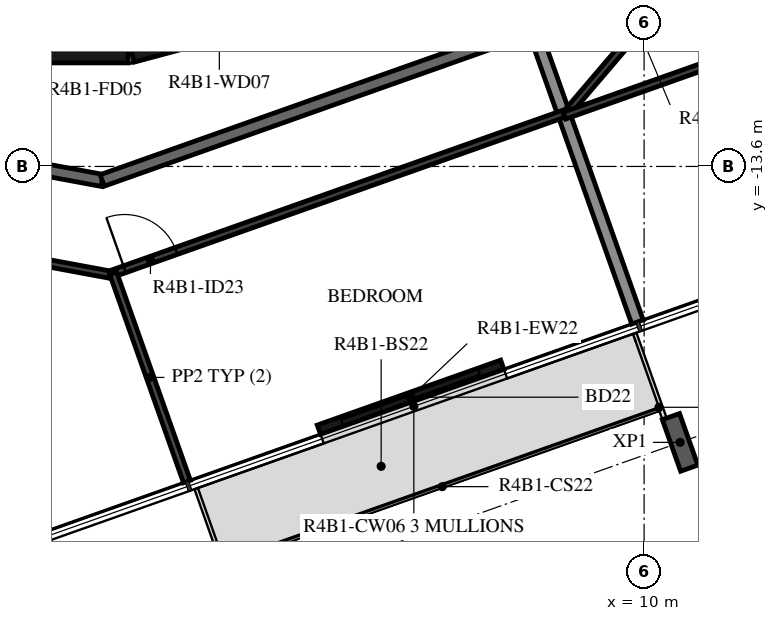
"""IFC4 building model, lengths in metres.
Left out: names, types, materials, properties, quantities, classifications, styles, units other than length and angle.
Written with IfcOpenShell. Run it as: python <this file> out.ifc"""

import sys

from ifc_helpers import new_model, si_unit, direction, frame, frame_2d, origin, origin_2d, place, context, subcontext, project, spatial, rectangle, i_section, extrude, element, fill, save


model = new_model("IFC4")
c1 = context("Model", 3, precision=1e-05, world=origin(), true_north=direction((0.0, 1.0)))
c2 = subcontext(c1, "Body", "Model", "MODEL_VIEW")
j1 = project(units=[si_unit("LENGTHUNIT", "METRE"), si_unit("PLANEANGLEUNIT", "RADIAN")], contexts=[c1])
p1 = place(None, origin())
s1 = spatial("IfcSite", under=j1, at=p1, CompositionType="ELEMENT")
p2 = place(p1, origin())
s2 = spatial("IfcBuilding", under=s1, at=p2, CompositionType="ELEMENT")
p3 = place(p2, frame((0.0, 0.0, 162.2)))
s3 = spatial("IfcBuildingStorey", under=s2, at=p3, CompositionType="ELEMENT", Elevation=162.2)
p4 = place(p3, frame((10.592, -18.138, -0.38), z_axis=(0.0, 0.0, 1.0), x_axis=(-0.942641392079, -0.333807138839, 0.0)))
e1 = element("IfcColumn", 1, at=p4, inside=s3, PredefinedType="COLUMN", context=c2, shape_type="SweptSolid", body=[
    extrude(i_section(OverallWidth=0.3, OverallDepth=0.9, WebThickness=0.019, FlangeThickness=0.035, FilletRadius=0.03, at=origin_2d()), origin(), (0.0, 0.0, 1.0), 3.5),
])
p5 = place(p3, frame((4.652, -17.929, 0.0), z_axis=(0.0, 0.0, 1.0), x_axis=(0.942620722428, 0.333865502335, 0.0)))
e2 = element("IfcWall", 2, at=p5, inside=s3, PredefinedType="STANDARD", context=c2, shape_type="SweptSolid", body=[
    extrude(rectangle(XDim=3.2, YDim=0.16, at=frame_2d((1.6, 0.0))), origin(), (0.0, 0.0, 1.0), 3.12),
])
p6 = place(p5, frame((0.4, 0.0, 0.0)))
e3 = element("IfcOpeningElement", 3, at=p6, cuts=e2, PredefinedType="OPENING", context=c2, shape_type="SweptSolid", body=[
    extrude(rectangle(XDim=2.4, YDim=2.4, at=frame_2d((1.2, 1.2))), frame((0.0, 0.09, 0.0), z_axis=(0.0, -1.0, 0.0), x_axis=(1.0, 0.0, 0.0)), (0.0, 0.0, 1.0), 0.18),
])
p7 = place(p3, frame((1.55, -11.643, 0.0), z_axis=(0.0, 0.0, 1.0), x_axis=(0.965948410781, 0.258734743916, 0.0)))
e4 = element("IfcWall", 4, at=p7, inside=s3, PredefinedType="SHEAR", context=c2, shape_type="SweptSolid", body=[
    extrude(rectangle(XDim=3.033, YDim=0.5, at=frame_2d((1.516, 0.0))), origin(), (0.0, 0.0, 1.0), 3.12),
])
p8 = place(p7, frame((1.066, 0.0, 0.0)))
e5 = element("IfcOpeningElement", 5, at=p8, cuts=e4, PredefinedType="OPENING", context=c2, shape_type="SweptSolid", body=[
    extrude(rectangle(XDim=0.9, YDim=2.1, at=frame_2d((0.45, 1.05))), frame((0.0, 0.26, 0.0), z_axis=(0.0, -1.0, 0.0), x_axis=(1.0, 0.0, 0.0)), (0.0, 0.0, 1.0), 0.52),
])
p9 = place(p3, frame((-1.516, -11.647, 0.0), z_axis=(0.0, 0.0, 1.0), x_axis=(1.0, 0.0, 0.0)))
e6 = element("IfcWall", 6, at=p9, inside=s3, PredefinedType="SHEAR", context=c2, shape_type="SweptSolid", body=[
    extrude(rectangle(XDim=3.033, YDim=0.5, at=frame_2d((1.516, 0.0))), origin(), (0.0, 0.0, 1.0), 3.12),
])
p10 = place(p9, frame((0.016, 0.0, 0.0)))
e7 = element("IfcOpeningElement", 7, at=p10, cuts=e6, PredefinedType="OPENING", context=c2, shape_type="SweptSolid", body=[
    extrude(rectangle(XDim=1.2, YDim=2.1, at=frame_2d((0.6, 1.05))), frame((0.0, 0.26, 0.0), z_axis=(0.0, -1.0, 0.0), x_axis=(1.0, 0.0, 0.0)), (0.0, 0.0, 1.0), 0.52),
])
p11 = place(p3, frame((-5.972, -12.521, 0.0), z_axis=(0.0, 0.0, 1.0), x_axis=(0.983256068163, -0.18222926335, 0.0)))
e8 = element("IfcWall", 8, at=p11, inside=s3, PredefinedType="STANDARD", context=c2, shape_type="SweptSolid", body=[
    extrude(rectangle(XDim=7.181, YDim=0.2, at=frame_2d((3.59, 0.0))), origin(), (0.0, 0.0, 1.0), 3.12),
])
p12 = place(p11, frame((4.6, 0.0, 0.0)))
e9 = element("IfcOpeningElement", 9, at=p12, cuts=e8, PredefinedType="OPENING", context=c2, shape_type="SweptSolid", body=[
    extrude(rectangle(XDim=1.0, YDim=2.1, at=frame_2d((0.5, 1.05))), frame((0.0, 0.11, 0.0), z_axis=(0.0, -1.0, 0.0), x_axis=(1.0, 0.0, 0.0)), (0.0, 0.0, 1.0), 0.22),
])
p13 = place(p3, frame((1.088, -13.83, 0.0), z_axis=(0.0, 0.0, 1.0), x_axis=(0.942648397945, 0.333787354241, 0.0)))
e10 = element("IfcWall", 10, at=p13, inside=s3, PredefinedType="STANDARD", context=c2, shape_type="SweptSolid", body=[
    extrude(rectangle(XDim=7.181, YDim=0.2, at=frame_2d((3.591, 0.0))), origin(), (0.0, 0.0, 1.0), 3.12),
])
p14 = place(p3, frame((9.891, -16.158, 0.0), z_axis=(0.0, 0.0, 1.0), x_axis=(-0.333807281402, 0.942641341594, 0.0)))
e11 = element("IfcWall", 11, at=p14, inside=s3, PredefinedType="STANDARD", context=c2, shape_type="SweptSolid", body=[
    extrude(rectangle(XDim=5.329, YDim=0.2, at=frame_2d((2.665, 0.0))), origin(), (0.0, 0.0, 1.0), 2.73),
])
p15 = place(p3, frame((-6.641, -13.923, 0.0), z_axis=(0.0, 0.0, 1.0), x_axis=(0.983250157272, -0.182261153912, 0.0)))
e12 = element("IfcWall", 12, at=p15, inside=s3, PredefinedType="PARTITIONING", context=c2, shape_type="SweptSolid", body=[
    extrude(rectangle(XDim=7.985, YDim=0.12, at=frame_2d((3.992, 0.0))), origin(), (0.0, 0.0, 1.0), 3.12),
])
p16 = place(p15, frame((5.051, 0.0, 0.0)))
e13 = element("IfcOpeningElement", 13, at=p16, cuts=e12, PredefinedType="OPENING", context=c2, shape_type="SweptSolid", body=[
    extrude(rectangle(XDim=0.9, YDim=2.1, at=frame_2d((0.45, 1.05))), frame((0.0, 0.07, 0.0), z_axis=(0.0, -1.0, 0.0), x_axis=(1.0, 0.0, 0.0)), (0.0, 0.0, 1.0), 0.14),
])
p17 = place(p3, frame((1.269, -15.357, 0.0), z_axis=(0.0, 0.0, 1.0), x_axis=(0.942639442898, 0.333812643101, 0.0)))
e14 = element("IfcWall", 14, at=p17, inside=s3, PredefinedType="PARTITIONING", context=c2, shape_type="SweptSolid", body=[
    extrude(rectangle(XDim=7.86, YDim=0.12, at=frame_2d((3.93, 0.0))), origin(), (0.0, 0.0, 1.0), 3.12),
])
p18 = place(p17, frame((0.2, 0.0, 0.0)))
e15 = element("IfcOpeningElement", 15, at=p18, cuts=e14, PredefinedType="OPENING", context=c2, shape_type="SweptSolid", body=[
    extrude(rectangle(XDim=0.9, YDim=2.1, at=frame_2d((0.45, 1.05))), frame((0.0, 0.07, 0.0), z_axis=(0.0, -1.0, 0.0), x_axis=(1.0, 0.0, 0.0)), (0.0, 0.0, 1.0), 0.14),
])
p19 = place(p3, frame((2.482, -18.782, 0.0), z_axis=(0.0, 0.0, 1.0), x_axis=(-0.33379364943, 0.942646168825, 0.0)))
e16 = element("IfcWall", 16, at=p19, inside=s3, PredefinedType="PARTITIONING", context=c2, shape_type="SweptSolid", body=[
    extrude(rectangle(XDim=3.633, YDim=0.12, at=frame_2d((1.816, 0.0))), origin(), (0.0, 0.0, 1.0), 2.73),
])
p20 = place(p3, frame((8.737, -12.713, 0.0), z_axis=(0.0, 0.0, 1.0), x_axis=(0.649430604754, 0.760420863476, 0.0)))
e17 = element("IfcWall", 17, at=p20, inside=s3, PredefinedType="PARTITIONING", context=c2, shape_type="SweptSolid", body=[
    extrude(rectangle(XDim=7.985, YDim=0.12, at=frame_2d((3.992, 0.0))), origin(), (0.0, 0.0, 1.0), 3.12),
])
p21 = place(p20, frame((1.4, 0.0, 0.0)))
e18 = element("IfcOpeningElement", 18, at=p21, cuts=e17, PredefinedType="OPENING", context=c2, shape_type="SweptSolid", body=[
    extrude(rectangle(XDim=0.8, YDim=2.1, at=frame_2d((0.4, 1.05))), frame((0.0, 0.07, 0.0), z_axis=(0.0, -1.0, 0.0), x_axis=(1.0, 0.0, 0.0)), (0.0, 0.0, 1.0), 0.14),
])
p22 = place(p3, frame((14.183, -10.819, 0.0), z_axis=(0.0, 0.0, 1.0), x_axis=(-0.942646448855, -0.333792858612, 0.0)))
e19 = element("IfcWall", 19, at=p22, inside=s3, PredefinedType="PARTITIONING", context=c2, shape_type="SweptSolid", body=[
    extrude(rectangle(XDim=5.828, YDim=0.12, at=frame_2d((2.914, 0.0))), origin(), (0.0, 0.0, 1.0), 3.12),
])
p23 = place(p6, origin())
e20 = element("IfcDoor", 20, at=p23, inside=s3, OperationType="DOUBLE_DOOR_SLIDING", PredefinedType="DOOR", context=c2, shape_type="SweptSolid", body=[
    extrude(rectangle(XDim=2.4, YDim=2.4, at=frame_2d((1.2, 1.2))), frame((0.0, 0.025, 0.0), z_axis=(0.0, -1.0, 0.0), x_axis=(1.0, 0.0, 0.0)), (0.0, 0.0, 1.0), 0.05),
])
fill(e3, e20)
p24 = place(p18, origin())
e21 = element("IfcDoor", 21, at=p24, inside=s3, OperationType="SINGLE_SWING_LEFT", PredefinedType="DOOR", context=c2, shape_type="SweptSolid", body=[
    extrude(rectangle(XDim=0.9, YDim=2.1, at=frame_2d((0.45, 1.05))), frame((0.0, 0.025, 0.0), z_axis=(0.0, -1.0, 0.0), x_axis=(1.0, 0.0, 0.0)), (0.0, 0.0, 1.0), 0.05),
])
fill(e15, e21)
save(model, sys.argv[1])
